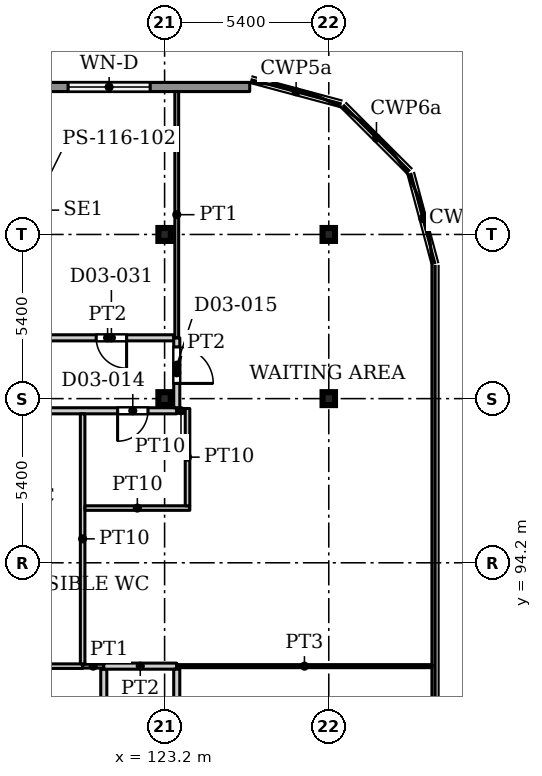
"""IFC4 building model, lengths in metres.
Left out: names, types, materials, properties, quantities, classifications, styles, units other than length and angle.
Written with IfcOpenShell. Run it as: python <this file> out.ifc"""

import sys

from ifc_helpers import new_model, si_unit, direction, frame, frame_2d, origin, origin_2d, place, context, subcontext, project, spatial, rectangle, i_section, extrude, source, transform, mapped, element, fill, save


model = new_model("IFC4")
c1 = context("Model", 3, precision=1e-05, world=origin(), true_north=direction((0.0, 1.0)))
c2 = subcontext(c1, "Body", "Model", "MODEL_VIEW")
j1 = project(units=[si_unit("LENGTHUNIT", "METRE"), si_unit("PLANEANGLEUNIT", "RADIAN")], contexts=[c1])
p1 = place(None, origin())
s1 = spatial("IfcSite", under=j1, at=p1, CompositionType="ELEMENT")
p2 = place(p1, origin())
s2 = spatial("IfcBuilding", under=s1, at=p2, CompositionType="ELEMENT")
p3 = place(p2, frame((0.0, 0.0, 17.0)))
s3 = spatial("IfcBuildingStorey", under=s2, at=p3, CompositionType="ELEMENT", Elevation=17.0)
for number, where, z_axis, x_axis in (
    (1, (123.2, 99.6, 0.0), (0.0, 0.0, 1.0), (1.0, 0.0, 0.0)),
    (2, (128.6, 99.6, 0.0), (0.0, 0.0, 1.0), (1.0, 0.0, 0.0)),
    (3, (123.2, 105.0, 0.0), (0.0, 0.0, 1.0), (1.0, 0.0, 0.0)),
    (4, (128.6, 105.0, 0.0), (0.0, 0.0, 1.0), (1.0, 0.0, 0.0)),
):
    element("IfcColumn", number, at=place(p3, frame(where, z_axis=z_axis, x_axis=x_axis)), inside=s3, PredefinedType="COLUMN", context=c2, shape_type="SweptSolid", body=[
        extrude(i_section(OverallWidth=0.409, OverallDepth=0.425, WebThickness=0.033, FlangeThickness=0.052, FilletRadius=0.013, at=origin_2d()), origin(), (0.0, 0.0, 1.0), 4.5),
    ])
p4 = place(p3, frame((78.48, 109.85, 0.0), z_axis=(0.0, 0.0, 1.0), x_axis=(1.0, 0.0, 0.0)))
e5 = element("IfcWall", 5, at=p4, inside=s3, PredefinedType="SOLIDWALL", context=c2, shape_type="SweptSolid", body=[
    extrude(rectangle(XDim=47.52, YDim=0.3, at=frame_2d((23.76, 0.0))), origin(), (0.0, 0.0, 1.0), 4.25),
])
p5 = place(p4, frame((1.045, 0.0, 0.9)))
e6 = element("IfcOpeningElement", 6, at=p5, cuts=e5, PredefinedType="OPENING", context=c2, shape_type="SweptSolid", body=[
    extrude(rectangle(XDim=2.7, YDim=2.1, at=frame_2d((1.35, 1.05))), frame((0.0, 0.16, 0.0), z_axis=(0.0, -1.0, 0.0), x_axis=(1.0, 0.0, 0.0)), (0.0, 0.0, 1.0), 0.32),
])
p6 = place(p4, frame((6.28, 0.0, 0.9)))
e7 = element("IfcOpeningElement", 7, at=p6, cuts=e5, PredefinedType="OPENING", context=c2, shape_type="SweptSolid", body=[
    extrude(rectangle(XDim=2.7, YDim=2.1, at=frame_2d((1.35, 1.05))), frame((0.0, 0.16, 0.0), z_axis=(0.0, -1.0, 0.0), x_axis=(1.0, 0.0, 0.0)), (0.0, 0.0, 1.0), 0.32),
])
p7 = place(p4, frame((15.765, 0.0, 0.9)))
e8 = element("IfcOpeningElement", 8, at=p7, cuts=e5, PredefinedType="OPENING", context=c2, shape_type="SweptSolid", body=[
    extrude(rectangle(XDim=2.7, YDim=2.1, at=frame_2d((1.35, 1.05))), frame((0.0, 0.16, 0.0), z_axis=(0.0, -1.0, 0.0), x_axis=(1.0, 0.0, 0.0)), (0.0, 0.0, 1.0), 0.32),
])
p8 = place(p4, frame((22.47, 0.0, 0.9)))
e9 = element("IfcOpeningElement", 9, at=p8, cuts=e5, PredefinedType="OPENING", context=c2, shape_type="SweptSolid", body=[
    extrude(rectangle(XDim=2.7, YDim=2.1, at=frame_2d((1.35, 1.05))), frame((0.0, 0.16, 0.0), z_axis=(0.0, -1.0, 0.0), x_axis=(1.0, 0.0, 0.0)), (0.0, 0.0, 1.0), 0.32),
])
p9 = place(p4, frame((30.99, 0.0, 0.9)))
e10 = element("IfcOpeningElement", 10, at=p9, cuts=e5, PredefinedType="OPENING", context=c2, shape_type="SweptSolid", body=[
    extrude(rectangle(XDim=2.7, YDim=2.1, at=frame_2d((1.35, 1.05))), frame((0.0, 0.16, 0.0), z_axis=(0.0, -1.0, 0.0), x_axis=(1.0, 0.0, 0.0)), (0.0, 0.0, 1.0), 0.32),
])
p10 = place(p4, frame((41.545, 0.0, 0.9)))
e11 = element("IfcOpeningElement", 11, at=p10, cuts=e5, PredefinedType="OPENING", context=c2, shape_type="SweptSolid", body=[
    extrude(rectangle(XDim=2.7, YDim=2.1, at=frame_2d((1.35, 1.05))), frame((0.0, 0.16, 0.0), z_axis=(0.0, -1.0, 0.0), x_axis=(1.0, 0.0, 0.0)), (0.0, 0.0, 1.0), 0.32),
])
p11 = place(p3, frame((56.1, 99.2, 0.0), z_axis=(0.0, 0.0, 1.0), x_axis=(1.0, 0.0, 0.0)))
e12 = element("IfcWall", 12, at=p11, inside=s3, PredefinedType="PARTITIONING", context=c2, shape_type="SweptSolid", body=[
    extrude(rectangle(XDim=67.5, YDim=0.2, at=frame_2d((33.75, 0.0))), origin(), (0.0, 0.0, 1.0), 4.18),
])
p12 = place(p11, frame((4.05, 0.0, 0.0)))
e13 = element("IfcOpeningElement", 13, at=p12, cuts=e12, PredefinedType="OPENING", context=c2, shape_type="SweptSolid", body=[
    extrude(rectangle(XDim=1.0, YDim=2.1, at=frame_2d((0.5, 1.05))), frame((0.0, 0.11, 0.0), z_axis=(0.0, -1.0, 0.0), x_axis=(1.0, 0.0, 0.0)), (0.0, 0.0, 1.0), 0.22),
])
p13 = place(p11, frame((65.554, 0.0, 0.0)))
e14 = element("IfcOpeningElement", 14, at=p13, cuts=e12, PredefinedType="OPENING", context=c2, shape_type="SweptSolid", body=[
    extrude(rectangle(XDim=1.0, YDim=2.1, at=frame_2d((0.5, 1.05))), frame((0.0, 0.11, 0.0), z_axis=(0.0, -1.0, 0.0), x_axis=(1.0, 0.0, 0.0)), (0.0, 0.0, 1.0), 0.22),
])
p14 = place(p11, frame((11.589, 0.0, 0.0)))
e15 = element("IfcOpeningElement", 15, at=p14, cuts=e12, PredefinedType="OPENING", context=c2, shape_type="SweptSolid", body=[
    extrude(rectangle(XDim=1.0, YDim=2.1, at=frame_2d((0.5, 1.05))), frame((0.0, 0.11, 0.0), z_axis=(0.0, -1.0, 0.0), x_axis=(1.0, 0.0, 0.0)), (0.0, 0.0, 1.0), 0.22),
])
p15 = place(p11, frame((20.329, 0.0, 0.0)))
e16 = element("IfcOpeningElement", 16, at=p15, cuts=e12, PredefinedType="OPENING", context=c2, shape_type="SweptSolid", body=[
    extrude(rectangle(XDim=1.0, YDim=2.1, at=frame_2d((0.5, 1.05))), frame((0.0, 0.11, 0.0), z_axis=(0.0, -1.0, 0.0), x_axis=(1.0, 0.0, 0.0)), (0.0, 0.0, 1.0), 0.22),
])
p16 = place(p11, frame((27.319, 0.0, 0.0)))
e17 = element("IfcOpeningElement", 17, at=p16, cuts=e12, PredefinedType="OPENING", context=c2, shape_type="SweptSolid", body=[
    extrude(rectangle(XDim=1.0, YDim=2.1, at=frame_2d((0.5, 1.05))), frame((0.0, 0.11, 0.0), z_axis=(0.0, -1.0, 0.0), x_axis=(1.0, 0.0, 0.0)), (0.0, 0.0, 1.0), 0.22),
])
p17 = place(p11, frame((33.262, 0.0, 0.0)))
e18 = element("IfcOpeningElement", 18, at=p17, cuts=e12, PredefinedType="OPENING", context=c2, shape_type="SweptSolid", body=[
    extrude(rectangle(XDim=1.0, YDim=2.1, at=frame_2d((0.5, 1.05))), frame((0.0, 0.11, 0.0), z_axis=(0.0, -1.0, 0.0), x_axis=(1.0, 0.0, 0.0)), (0.0, 0.0, 1.0), 0.22),
])
p18 = place(p11, frame((42.002, 0.0, 0.0)))
e19 = element("IfcOpeningElement", 19, at=p18, cuts=e12, PredefinedType="OPENING", context=c2, shape_type="SweptSolid", body=[
    extrude(rectangle(XDim=1.0, YDim=2.1, at=frame_2d((0.5, 1.05))), frame((0.0, 0.11, 0.0), z_axis=(0.0, -1.0, 0.0), x_axis=(1.0, 0.0, 0.0)), (0.0, 0.0, 1.0), 0.22),
])
p19 = place(p11, frame((49.743, 0.0, 0.0)))
e20 = element("IfcOpeningElement", 20, at=p19, cuts=e12, PredefinedType="OPENING", context=c2, shape_type="SweptSolid", body=[
    extrude(rectangle(XDim=1.0, YDim=2.1, at=frame_2d((0.5, 1.05))), frame((0.0, 0.11, 0.0), z_axis=(0.0, -1.0, 0.0), x_axis=(1.0, 0.0, 0.0)), (0.0, 0.0, 1.0), 0.22),
])
p20 = place(p11, frame((56.733, 0.0, 0.0)))
e21 = element("IfcOpeningElement", 21, at=p20, cuts=e12, PredefinedType="OPENING", context=c2, shape_type="SweptSolid", body=[
    extrude(rectangle(XDim=1.0, YDim=2.1, at=frame_2d((0.5, 1.05))), frame((0.0, 0.11, 0.0), z_axis=(0.0, -1.0, 0.0), x_axis=(1.0, 0.0, 0.0)), (0.0, 0.0, 1.0), 0.22),
])
p21 = place(p11, frame((61.394, 0.0, 0.0)))
e22 = element("IfcOpeningElement", 22, at=p21, cuts=e12, PredefinedType="OPENING", context=c2, shape_type="SweptSolid", body=[
    extrude(rectangle(XDim=1.0, YDim=2.1, at=frame_2d((0.5, 1.05))), frame((0.0, 0.11, 0.0), z_axis=(0.0, -1.0, 0.0), x_axis=(1.0, 0.0, 0.0)), (0.0, 0.0, 1.0), 0.22),
])
p22 = place(p3, frame((110.183, 90.8, 0.0), z_axis=(0.0, 0.0, 1.0), x_axis=(1.0, 0.0, 0.0)))
e23 = element("IfcWall", 23, at=p22, inside=s3, PredefinedType="PARTITIONING", context=c2, shape_type="SweptSolid", body=[
    extrude(rectangle(XDim=10.321, YDim=0.15, at=frame_2d((5.16, 0.0))), origin(), (0.0, 0.0, 1.0), 4.18),
])
p23 = place(p3, frame((119.15, 101.6, 0.0), z_axis=(0.0, 0.0, 1.0), x_axis=(1.0, 0.0, 0.0)))
e24 = element("IfcWall", 24, at=p23, inside=s3, PredefinedType="PARTITIONING", context=c2, shape_type="SweptSolid", body=[
    extrude(rectangle(XDim=4.35, YDim=0.2, at=frame_2d((2.175, 0.0))), origin(), (0.0, 0.0, 1.0), 4.18),
])
p24 = place(p23, frame((1.8, 0.0, 0.0)))
e25 = element("IfcOpeningElement", 25, at=p24, cuts=e24, PredefinedType="OPENING", context=c2, shape_type="SweptSolid", body=[
    extrude(rectangle(XDim=1.0, YDim=2.1, at=frame_2d((0.5, 1.05))), frame((0.0, 0.11, 0.0), z_axis=(0.0, -1.0, 0.0), x_axis=(1.0, 0.0, 0.0)), (0.0, 0.0, 1.0), 0.22),
])
p25 = place(p3, frame((120.504, 90.8, 0.0), z_axis=(0.0, 0.0, 1.0), x_axis=(1.0, 0.0, 0.0)))
e26 = element("IfcWall", 26, at=p25, inside=s3, PredefinedType="PARTITIONING", context=c2, shape_type="SweptSolid", body=[
    extrude(rectangle(XDim=0.696, YDim=0.125, at=frame_2d((0.348, 0.0))), origin(), (0.0, 0.0, 1.0), 4.18),
])
p26 = place(p3, frame((120.504, 90.875, 0.0), z_axis=(0.0, 0.0, 1.0), x_axis=(0.0, 1.0, 0.0)))
e27 = element("IfcWall", 27, at=p26, inside=s3, PredefinedType="PARTITIONING", context=c2, shape_type="SweptSolid", body=[
    extrude(rectangle(XDim=8.225, YDim=0.15, at=frame_2d((4.113, 0.0))), origin(), (0.0, 0.0, 1.0), 4.18),
])
p27 = place(p3, frame((120.579, 96.0, 0.0), z_axis=(0.0, 0.0, 1.0), x_axis=(1.0, 0.0, 0.0)))
e28 = element("IfcWall", 28, at=p27, inside=s3, PredefinedType="PARTITIONING", context=c2, shape_type="SweptSolid", body=[
    extrude(rectangle(XDim=3.45, YDim=0.15, at=frame_2d((1.725, 0.0))), origin(), (0.0, 0.0, 1.0), 4.18),
])
p28 = place(p3, frame((121.2, 74.6, 0.0), z_axis=(0.0, 0.0, 1.0), x_axis=(0.0, 1.0, 0.0)))
e29 = element("IfcWall", 29, at=p28, inside=s3, PredefinedType="PARTITIONING", context=c2, shape_type="SweptSolid", body=[
    extrude(rectangle(XDim=16.1, YDim=0.2, at=frame_2d((8.05, 0.0))), origin(), (0.0, 0.0, 1.0), 4.18),
])
p29 = place(p28, frame((3.987, 0.0, 0.0)))
e30 = element("IfcOpeningElement", 30, at=p29, cuts=e29, PredefinedType="OPENING", context=c2, shape_type="SweptSolid", body=[
    extrude(rectangle(XDim=1.0, YDim=2.1, at=frame_2d((0.5, 1.05))), frame((0.0, 0.11, 0.0), z_axis=(0.0, -1.0, 0.0), x_axis=(1.0, 0.0, 0.0)), (0.0, 0.0, 1.0), 0.22),
])
p30 = place(p28, frame((12.05, 0.0, 0.0)))
e31 = element("IfcOpeningElement", 31, at=p30, cuts=e29, PredefinedType="OPENING", context=c2, shape_type="SweptSolid", body=[
    extrude(rectangle(XDim=1.0, YDim=2.1, at=frame_2d((0.5, 1.05))), frame((0.0, 0.11, 0.0), z_axis=(0.0, -1.0, 0.0), x_axis=(1.0, 0.0, 0.0)), (0.0, 0.0, 1.0), 0.22),
])
p31 = place(p3, frame((121.2, 90.8, 0.0), z_axis=(0.0, 0.0, 1.0), x_axis=(1.0, 0.0, 0.0)))
e32 = element("IfcWall", 32, at=p31, inside=s3, PredefinedType="PARTITIONING", context=c2, shape_type="SweptSolid", body=[
    extrude(rectangle(XDim=2.4, YDim=0.2, at=frame_2d((1.2, 0.0))), origin(), (0.0, 0.0, 1.0), 4.18),
])
p32 = place(p3, frame((123.6, 69.15, 0.0), z_axis=(0.0, 0.0, 1.0), x_axis=(0.0, 1.0, 0.0)))
e33 = element("IfcWall", 33, at=p32, inside=s3, PredefinedType="PARTITIONING", context=c2, shape_type="SweptSolid", body=[
    extrude(rectangle(XDim=21.55, YDim=0.2, at=frame_2d((10.775, 0.0))), origin(), (0.0, 0.0, 1.0), 4.18),
])
p33 = place(p32, frame((4.4, 0.0, 0.0)))
e34 = element("IfcOpeningElement", 34, at=p33, cuts=e33, PredefinedType="OPENING", context=c2, shape_type="SweptSolid", body=[
    extrude(rectangle(XDim=1.0, YDim=2.1, at=frame_2d((0.5, 1.05))), frame((0.0, 0.11, 0.0), z_axis=(0.0, -1.0, 0.0), x_axis=(1.0, 0.0, 0.0)), (0.0, 0.0, 1.0), 0.22),
])
p34 = place(p32, frame((15.238, 0.0, 0.0)))
e35 = element("IfcOpeningElement", 35, at=p34, cuts=e33, PredefinedType="OPENING", context=c2, shape_type="SweptSolid", body=[
    extrude(rectangle(XDim=1.0, YDim=2.1, at=frame_2d((0.5, 1.05))), frame((0.0, 0.11, 0.0), z_axis=(0.0, -1.0, 0.0), x_axis=(1.0, 0.0, 0.0)), (0.0, 0.0, 1.0), 0.22),
])
p35 = place(p32, frame((11.238, 0.0, 0.0)))
e36 = element("IfcOpeningElement", 36, at=p35, cuts=e33, PredefinedType="OPENING", context=c2, shape_type="SweptSolid", body=[
    extrude(rectangle(XDim=1.2, YDim=2.1, at=frame_2d((0.6, 1.05))), frame((0.0, 0.11, 0.0), z_axis=(0.0, -1.0, 0.0), x_axis=(1.0, 0.0, 0.0)), (0.0, 0.0, 1.0), 0.22),
])
p36 = place(p3, frame((123.6, 90.8, 0.0), z_axis=(0.0, 0.0, 1.0), x_axis=(1.0, 0.0, 0.0)))
e37 = element("IfcWall", 37, at=p36, inside=s3, PredefinedType="PARTITIONING", context=c2, shape_type="SweptSolid", body=[
    extrude(rectangle(XDim=8.4, YDim=0.1, at=frame_2d((4.2, 0.0))), origin(), (0.0, 0.0, 1.0), 4.18),
])
p37 = place(p3, frame((123.6, 99.2, 0.0), z_axis=(0.0, 0.0, 1.0), x_axis=(1.0, 0.0, 0.0)))
e38 = element("IfcWall", 38, at=p37, inside=s3, PredefinedType="PARTITIONING", context=c2, shape_type="SweptSolid", body=[
    extrude(rectangle(XDim=0.279, YDim=0.15, at=frame_2d((0.139, 0.0))), origin(), (0.0, 0.0, 1.0), 4.18),
])
p38 = place(p3, frame((123.6, 99.3, 0.0), z_axis=(0.0, 0.0, 1.0), x_axis=(0.0, 1.0, 0.0)))
e39 = element("IfcWall", 39, at=p38, inside=s3, PredefinedType="PARTITIONING", context=c2, shape_type="SweptSolid", body=[
    extrude(rectangle(XDim=2.3, YDim=0.2, at=frame_2d((1.15, 0.0))), origin(), (0.0, 0.0, 1.0), 4.18),
])
p39 = place(p38, frame((0.8, 0.0, 0.0)))
e40 = element("IfcOpeningElement", 40, at=p39, cuts=e39, PredefinedType="OPENING", context=c2, shape_type="SweptSolid", body=[
    extrude(rectangle(XDim=1.2, YDim=2.1, at=frame_2d((0.6, 1.05))), frame((0.0, 0.11, 0.0), z_axis=(0.0, -1.0, 0.0), x_axis=(1.0, 0.0, 0.0)), (0.0, 0.0, 1.0), 0.22),
])
p40 = place(p3, frame((123.6, 101.6, 0.0), z_axis=(0.0, 0.0, 1.0), x_axis=(0.0, 1.0, 0.0)))
e41 = element("IfcWall", 41, at=p40, inside=s3, PredefinedType="PARTITIONING", context=c2, shape_type="SweptSolid", body=[
    extrude(rectangle(XDim=8.101, YDim=0.125, at=frame_2d((4.05, 0.0))), origin(), (0.0, 0.0, 1.0), 4.18),
])
p41 = place(p3, frame((123.954, 96.075, 0.0), z_axis=(0.0, 0.0, 1.0), x_axis=(0.0, 1.0, 0.0)))
e42 = element("IfcWall", 42, at=p41, inside=s3, PredefinedType="PARTITIONING", context=c2, shape_type="SweptSolid", body=[
    extrude(rectangle(XDim=3.2, YDim=0.15, at=frame_2d((1.6, 0.0))), origin(), (0.0, 0.0, 1.0), 4.18),
])
m1 = source(origin(), c2, "Body", "SweptSolid", [
    extrude(rectangle(XDim=2.7, YDim=2.1, at=frame_2d((1.35, 1.05))), frame((0.0, 0.03, 0.0), z_axis=(0.0, -1.0, 0.0), x_axis=(1.0, 0.0, 0.0)), (0.0, 0.0, 1.0), 0.06),
])
p42 = place(p10, origin())
e43 = element("IfcWindow", 43, at=p42, inside=s3, PartitioningType="SINGLE_PANEL", PredefinedType="WINDOW", context=c2, shape_type="MappedRepresentation", body=[
    mapped(m1, transform((0.0, 0.0, 0.0), x_axis=(1.0, 0.0, 0.0), y_axis=(0.0, 1.0, 0.0), z_axis=(0.0, 0.0, 1.0), scale=1.0)),
])
fill(e11, e43)
m2 = source(origin(), c2, "Body", "SweptSolid", [
    extrude(rectangle(XDim=1.0, YDim=2.1, at=frame_2d((0.5, 1.05))), frame((0.0, 0.025, 0.0), z_axis=(0.0, -1.0, 0.0), x_axis=(1.0, 0.0, 0.0)), (0.0, 0.0, 1.0), 0.05),
])
p43 = place(p13, origin())
e44 = element("IfcDoor", 44, at=p43, inside=s3, OperationType="SINGLE_SWING_RIGHT", PredefinedType="DOOR", context=c2, shape_type="MappedRepresentation", body=[
    mapped(m2, transform((0.0, 0.0, 0.0), x_axis=(1.0, 0.0, 0.0), y_axis=(0.0, 1.0, 0.0), z_axis=(0.0, 0.0, 1.0), scale=1.0)),
])
fill(e14, e44)
m3 = source(origin(), c2, "Body", "SweptSolid", [
    extrude(rectangle(XDim=1.2, YDim=2.1, at=frame_2d((0.6, 1.05))), frame((0.0, 0.025, 0.0), z_axis=(0.0, -1.0, 0.0), x_axis=(1.0, 0.0, 0.0)), (0.0, 0.0, 1.0), 0.05),
])
p44 = place(p39, origin())
e45 = element("IfcDoor", 45, at=p44, inside=s3, OperationType="SINGLE_SWING_RIGHT", PredefinedType="DOOR", context=c2, shape_type="MappedRepresentation", body=[
    mapped(m3, transform((0.0, 0.0, 0.0), x_axis=(1.0, 0.0, 0.0), y_axis=(0.0, 1.0, 0.0), z_axis=(0.0, 0.0, 1.0), scale=1.0)),
])
fill(e40, e45)
p45 = place(p24, origin())
e46 = element("IfcDoor", 46, at=p45, inside=s3, OperationType="SINGLE_SWING_RIGHT", PredefinedType="DOOR", context=c2, shape_type="MappedRepresentation", body=[
    mapped(m2, transform((0.0, 0.0, 0.0), x_axis=(1.0, 0.0, 0.0), y_axis=(0.0, 1.0, 0.0), z_axis=(0.0, 0.0, 1.0), scale=1.0)),
])
fill(e25, e46)
save(model, sys.argv[1])
